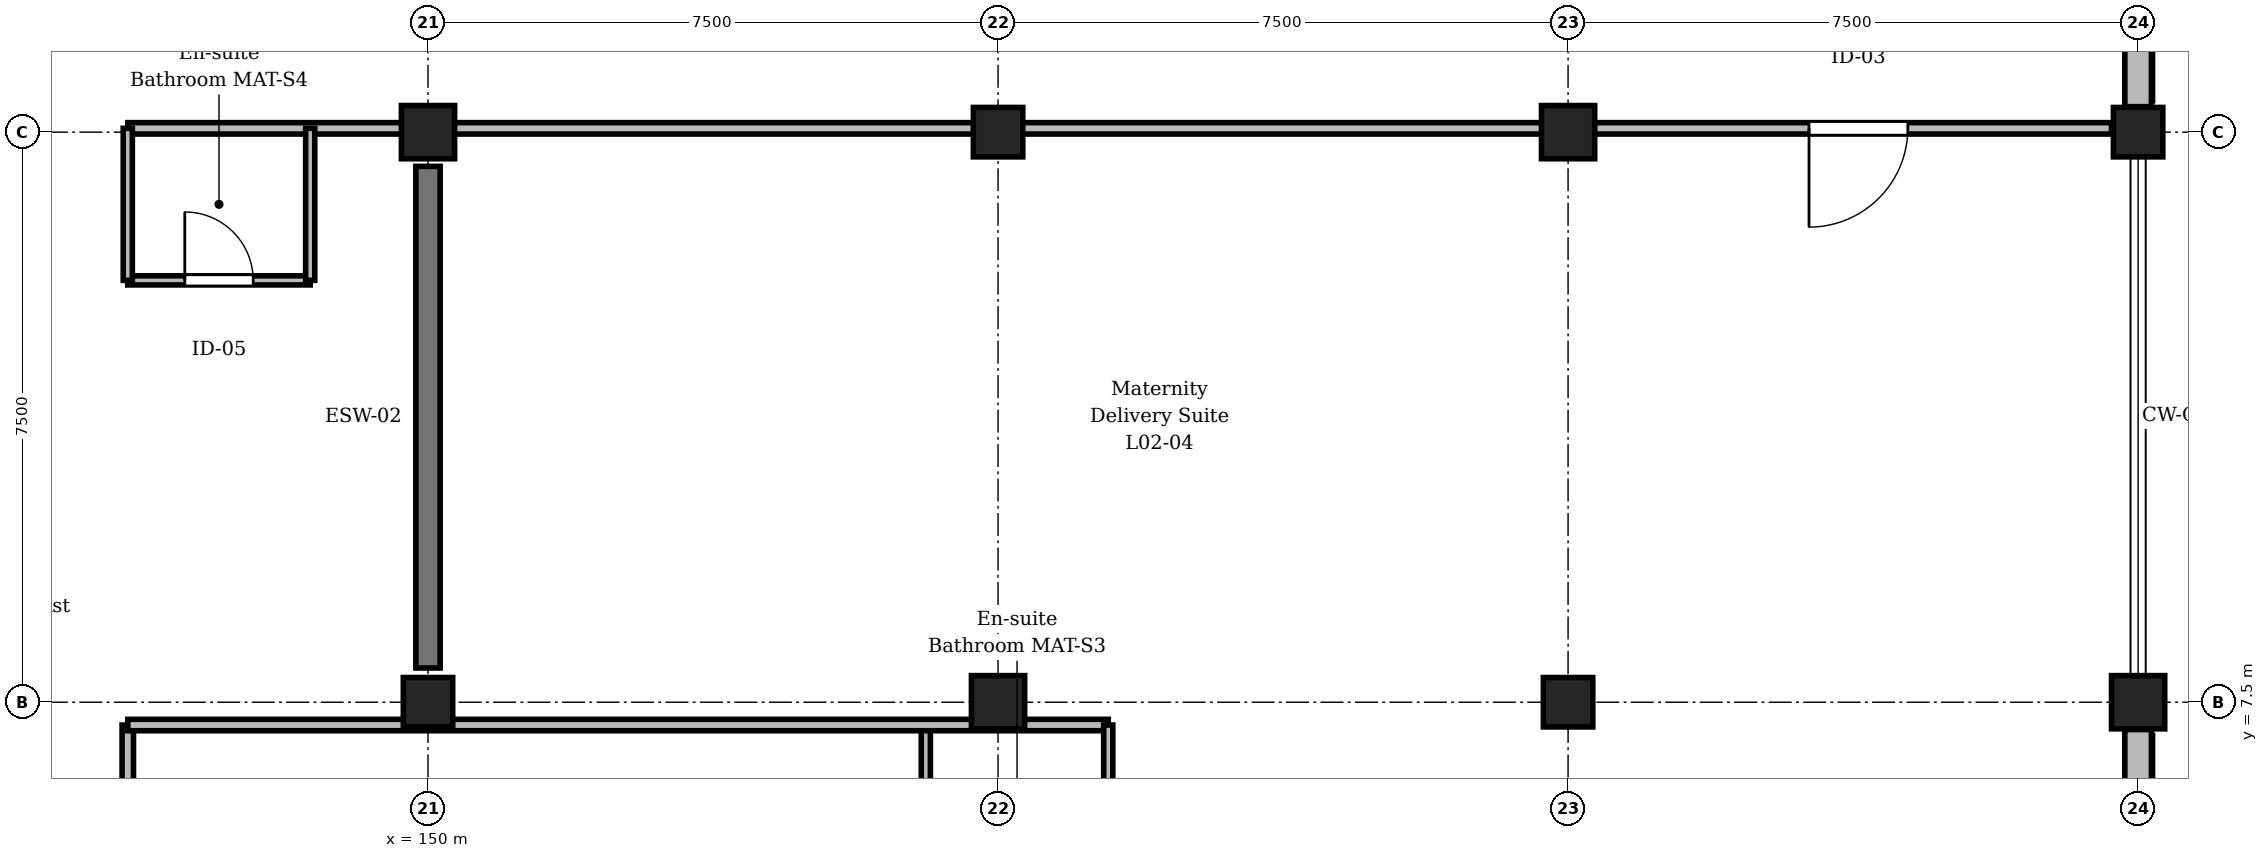
"""IFC4 building model, lengths in metres.
Left out: names, types, materials, properties, quantities, classifications, styles, units other than length and angle.
Written with IfcOpenShell. Run it as: python <this file> out.ifc"""

import sys

from ifc_helpers import new_model, si_unit, direction, frame, frame_2d, origin, origin_2d, place, context, subcontext, project, spatial, rectangle, extrude, element, fill, save


model = new_model("IFC4")
c1 = context("Model", 3, precision=1e-05, world=origin(), true_north=direction((0.0, 1.0)))
c2 = subcontext(c1, "Body", "Model", "MODEL_VIEW")
j1 = project(units=[si_unit("LENGTHUNIT", "METRE"), si_unit("PLANEANGLEUNIT", "RADIAN")], contexts=[c1])
p1 = place(None, origin())
s1 = spatial("IfcSite", under=j1, at=p1, CompositionType="ELEMENT")
p2 = place(p1, origin())
s2 = spatial("IfcBuilding", under=s1, at=p2, CompositionType="ELEMENT")
p3 = place(p2, frame((0.0, 0.0, 9.3)))
s3 = spatial("IfcBuildingStorey", under=s2, at=p3, CompositionType="ELEMENT", Elevation=9.3)
p4 = place(p3, frame((150.0, 7.5, 0.0), z_axis=(0.0, 0.0, 1.0), x_axis=(1.0, 0.0, 0.0)))
e1 = element("IfcColumn", 1, at=p4, inside=s3, PredefinedType="COLUMN", context=c2, shape_type="SweptSolid", body=[
    extrude(rectangle(XDim=0.65, YDim=0.65, at=origin_2d()), origin(), (0.0, 0.0, 1.0), 4.8),
])
for number, where, z_axis, x_axis in (
    (2, (150.0, 15.0, 0.0), (0.0, 0.0, 1.0), (1.0, 0.0, 0.0)),
    (3, (157.5, 7.5, 0.0), (0.0, 0.0, 1.0), (1.0, 0.0, 0.0)),
):
    element("IfcColumn", number, at=place(p3, frame(where, z_axis=z_axis, x_axis=x_axis)), inside=s3, PredefinedType="COLUMN", context=c2, shape_type="SweptSolid", body=[
        extrude(rectangle(XDim=0.7, YDim=0.7, at=origin_2d()), origin(), (0.0, 0.0, 1.0), 4.8),
    ])
for number, where, z_axis, x_axis in (
    (4, (157.5, 15.0, 0.0), (0.0, 0.0, 1.0), (1.0, 0.0, 0.0)),
    (5, (165.0, 7.5, 0.0), (0.0, 0.0, 1.0), (1.0, 0.0, 0.0)),
):
    element("IfcColumn", number, at=place(p3, frame(where, z_axis=z_axis, x_axis=x_axis)), inside=s3, PredefinedType="COLUMN", context=c2, shape_type="SweptSolid", body=[
        extrude(rectangle(XDim=0.65, YDim=0.65, at=origin_2d()), origin(), (0.0, 0.0, 1.0), 4.8),
    ])
for number, where, z_axis, x_axis in (
    (6, (165.0, 15.0, 0.0), (0.0, 0.0, 1.0), (1.0, 0.0, 0.0)),
    (7, (172.5, 7.5, 0.0), (0.0, 0.0, 1.0), (1.0, 0.0, 0.0)),
):
    element("IfcColumn", number, at=place(p3, frame(where, z_axis=z_axis, x_axis=x_axis)), inside=s3, PredefinedType="COLUMN", context=c2, shape_type="SweptSolid", body=[
        extrude(rectangle(XDim=0.7, YDim=0.7, at=origin_2d()), origin(), (0.0, 0.0, 1.0), 4.8),
    ])
p5 = place(p3, frame((172.5, 15.0, 0.0), z_axis=(0.0, 0.0, 1.0), x_axis=(1.0, 0.0, 0.0)))
e8 = element("IfcColumn", 8, at=p5, inside=s3, PredefinedType="COLUMN", context=c2, shape_type="SweptSolid", body=[
    extrude(rectangle(XDim=0.65, YDim=0.65, at=origin_2d()), origin(), (0.0, 0.0, 1.0), 4.8),
])
p6 = place(p3, frame((150.0, 7.95, 0.0), z_axis=(0.0, 0.0, 1.0), x_axis=(0.0, 1.0, 0.0)))
e9 = element("IfcWall", 9, at=p6, inside=s3, PredefinedType="SHEAR", context=c2, shape_type="SweptSolid", body=[
    extrude(rectangle(XDim=6.6, YDim=0.32, at=frame_2d((3.3, 0.0))), origin(), (0.0, 0.0, 1.0), 4.0),
])
p7 = place(p3, frame((172.5, 7.14, 0.0), z_axis=(0.0, 0.0, 1.0), x_axis=(0.0, -1.0, 0.0)))
e10 = element("IfcWall", 10, at=p7, inside=s3, PredefinedType="STANDARD", context=c2, shape_type="SweptSolid", body=[
    extrude(rectangle(XDim=6.905, YDim=0.35, at=frame_2d((3.452, 0.0))), origin(), (0.0, 0.0, 1.0), 3.95),
])
p8 = place(p7, frame((2.752, 0.0, 0.9)))
e11 = element("IfcOpeningElement", 11, at=p8, cuts=e10, PredefinedType="OPENING", context=c2, shape_type="SweptSolid", body=[
    extrude(rectangle(XDim=1.4, YDim=1.8, at=frame_2d((0.7, 0.9))), frame((0.0, 0.185, 0.0), z_axis=(0.0, -1.0, 0.0), x_axis=(1.0, 0.0, 0.0)), (0.0, 0.0, 1.0), 0.37),
])
p9 = place(p3, frame((172.5, 22.14, 0.0), z_axis=(0.0, 0.0, 1.0), x_axis=(0.0, -1.0, 0.0)))
e12 = element("IfcWall", 12, at=p9, inside=s3, PredefinedType="STANDARD", context=c2, shape_type="SweptSolid", body=[
    extrude(rectangle(XDim=6.805, YDim=0.35, at=frame_2d((3.402, 0.0))), origin(), (0.0, 0.0, 1.0), 3.95),
])
p10 = place(p9, frame((2.502, 0.0, 0.9)))
e13 = element("IfcOpeningElement", 13, at=p10, cuts=e12, PredefinedType="OPENING", context=c2, shape_type="SweptSolid", body=[
    extrude(rectangle(XDim=1.8, YDim=1.8, at=frame_2d((0.9, 0.9))), frame((0.0, 0.185, 0.0), z_axis=(0.0, -1.0, 0.0), x_axis=(1.0, 0.0, 0.0)), (0.0, 0.0, 1.0), 0.37),
])
p11 = place(p3, frame((146.05, 7.2, 0.0), z_axis=(0.0, 0.0, 1.0), x_axis=(0.0, -1.0, 0.0)))
e14 = element("IfcWall", 14, at=p11, inside=s3, PredefinedType="PARTITIONING", context=c2, shape_type="SweptSolid", body=[
    extrude(rectangle(XDim=6.85, YDim=0.15, at=frame_2d((3.425, 0.0))), origin(), (0.0, 0.0, 1.0), 4.535),
])
p12 = place(p11, frame((2.775, 0.0, 0.0)))
e15 = element("IfcOpeningElement", 15, at=p12, cuts=e14, PredefinedType="OPENING", context=c2, shape_type="SweptSolid", body=[
    extrude(rectangle(XDim=1.3, YDim=2.2, at=frame_2d((0.65, 1.1))), frame((0.0, 0.085, 0.0), z_axis=(0.0, -1.0, 0.0), x_axis=(1.0, 0.0, 0.0)), (0.0, 0.0, 1.0), 0.17),
])
p13 = place(p3, frame((156.55, 5.2, 0.0), z_axis=(0.0, 0.0, 1.0), x_axis=(0.0, 1.0, 0.0)))
e16 = element("IfcWall", 16, at=p13, inside=s3, PredefinedType="PARTITIONING", context=c2, shape_type="SweptSolid", body=[
    extrude(rectangle(XDim=2.0, YDim=0.12, at=frame_2d((1.0, 0.0))), origin(), (0.0, 0.0, 1.0), 4.535),
])
p14 = place(p3, frame((172.15, 15.05, 0.0), z_axis=(0.0, 0.0, 1.0), x_axis=(-1.0, 0.0, 0.0)))
e17 = element("IfcWall", 17, at=p14, inside=s3, PredefinedType="PARTITIONING", context=c2, shape_type="SweptSolid", body=[
    extrude(rectangle(XDim=26.1, YDim=0.15, at=frame_2d((13.05, 0.0))), origin(), (0.0, 0.0, 1.0), 3.985),
])
p15 = place(p14, frame((2.68, 0.0, 0.0)))
e18 = element("IfcOpeningElement", 18, at=p15, cuts=e17, PredefinedType="OPENING", context=c2, shape_type="SweptSolid", body=[
    extrude(rectangle(XDim=1.3, YDim=2.2, at=frame_2d((0.65, 1.1))), frame((0.0, 0.085, 0.0), z_axis=(0.0, -1.0, 0.0), x_axis=(1.0, 0.0, 0.0)), (0.0, 0.0, 1.0), 0.17),
])
p16 = place(p3, frame((146.05, 13.05, 0.0), z_axis=(0.0, 0.0, 1.0), x_axis=(1.0, 0.0, 0.0)))
e19 = element("IfcWall", 19, at=p16, inside=s3, PredefinedType="PARTITIONING", context=c2, shape_type="SweptSolid", body=[
    extrude(rectangle(XDim=2.4, YDim=0.12, at=frame_2d((1.2, 0.0))), origin(), (0.0, 0.0, 1.0), 4.535),
])
p17 = place(p16, frame((0.75, 0.0, 0.0)))
e20 = element("IfcOpeningElement", 20, at=p17, cuts=e19, PredefinedType="OPENING", context=c2, shape_type="SweptSolid", body=[
    extrude(rectangle(XDim=0.9, YDim=2.1, at=frame_2d((0.45, 1.05))), frame((0.0, 0.07, 0.0), z_axis=(0.0, -1.0, 0.0), x_axis=(1.0, 0.0, 0.0)), (0.0, 0.0, 1.0), 0.14),
])
p18 = place(p3, frame((148.45, 13.05, 0.0), z_axis=(0.0, 0.0, 1.0), x_axis=(0.0, 1.0, 0.0)))
e21 = element("IfcWall", 21, at=p18, inside=s3, PredefinedType="PARTITIONING", context=c2, shape_type="SweptSolid", body=[
    extrude(rectangle(XDim=2.0, YDim=0.12, at=frame_2d((1.0, 0.0))), origin(), (0.0, 0.0, 1.0), 4.535),
])
p19 = place(p3, frame((146.05, 7.2, 0.0), z_axis=(0.0, 0.0, 1.0), x_axis=(1.0, 0.0, 0.0)))
e22 = element("IfcWall", 22, at=p19, inside=s3, PredefinedType="PARTITIONING", context=c2, shape_type="SweptSolid", body=[
    extrude(rectangle(XDim=12.9, YDim=0.15, at=frame_2d((6.45, 0.0))), origin(), (0.0, 0.0, 1.0), 3.985),
])
for number, where, z_axis, x_axis in (
    (23, (158.95, 5.2, 0.0), (0.0, 0.0, 1.0), (0.0, 1.0, 0.0)),
    (24, (146.05, 13.05, 0.0), (0.0, 0.0, 1.0), (0.0, 1.0, 0.0)),
):
    element("IfcWall", number, at=place(p3, frame(where, z_axis=z_axis, x_axis=x_axis)), inside=s3, PredefinedType="PARTITIONING", context=c2, shape_type="SweptSolid", body=[
        extrude(rectangle(XDim=2.0, YDim=0.12, at=frame_2d((1.0, 0.0))), origin(), (0.0, 0.0, 1.0), 4.535),
    ])
p20 = place(p15, origin())
e25 = element("IfcDoor", 25, at=p20, inside=s3, OperationType="SINGLE_SWING_RIGHT", PredefinedType="DOOR", context=c2, shape_type="SweptSolid", body=[
    extrude(rectangle(XDim=1.3, YDim=2.2, at=frame_2d((0.65, 1.1))), frame((0.0, 0.025, 0.0), z_axis=(0.0, -1.0, 0.0), x_axis=(1.0, 0.0, 0.0)), (0.0, 0.0, 1.0), 0.05),
])
fill(e18, e25)
p21 = place(p17, origin())
e26 = element("IfcDoor", 26, at=p21, inside=s3, OperationType="SINGLE_SWING_LEFT", PredefinedType="DOOR", context=c2, shape_type="SweptSolid", body=[
    extrude(rectangle(XDim=0.9, YDim=2.1, at=frame_2d((0.45, 1.05))), frame((0.0, 0.025, 0.0), z_axis=(0.0, -1.0, 0.0), x_axis=(1.0, 0.0, 0.0)), (0.0, 0.0, 1.0), 0.05),
])
fill(e20, e26)
save(model, sys.argv[1])
